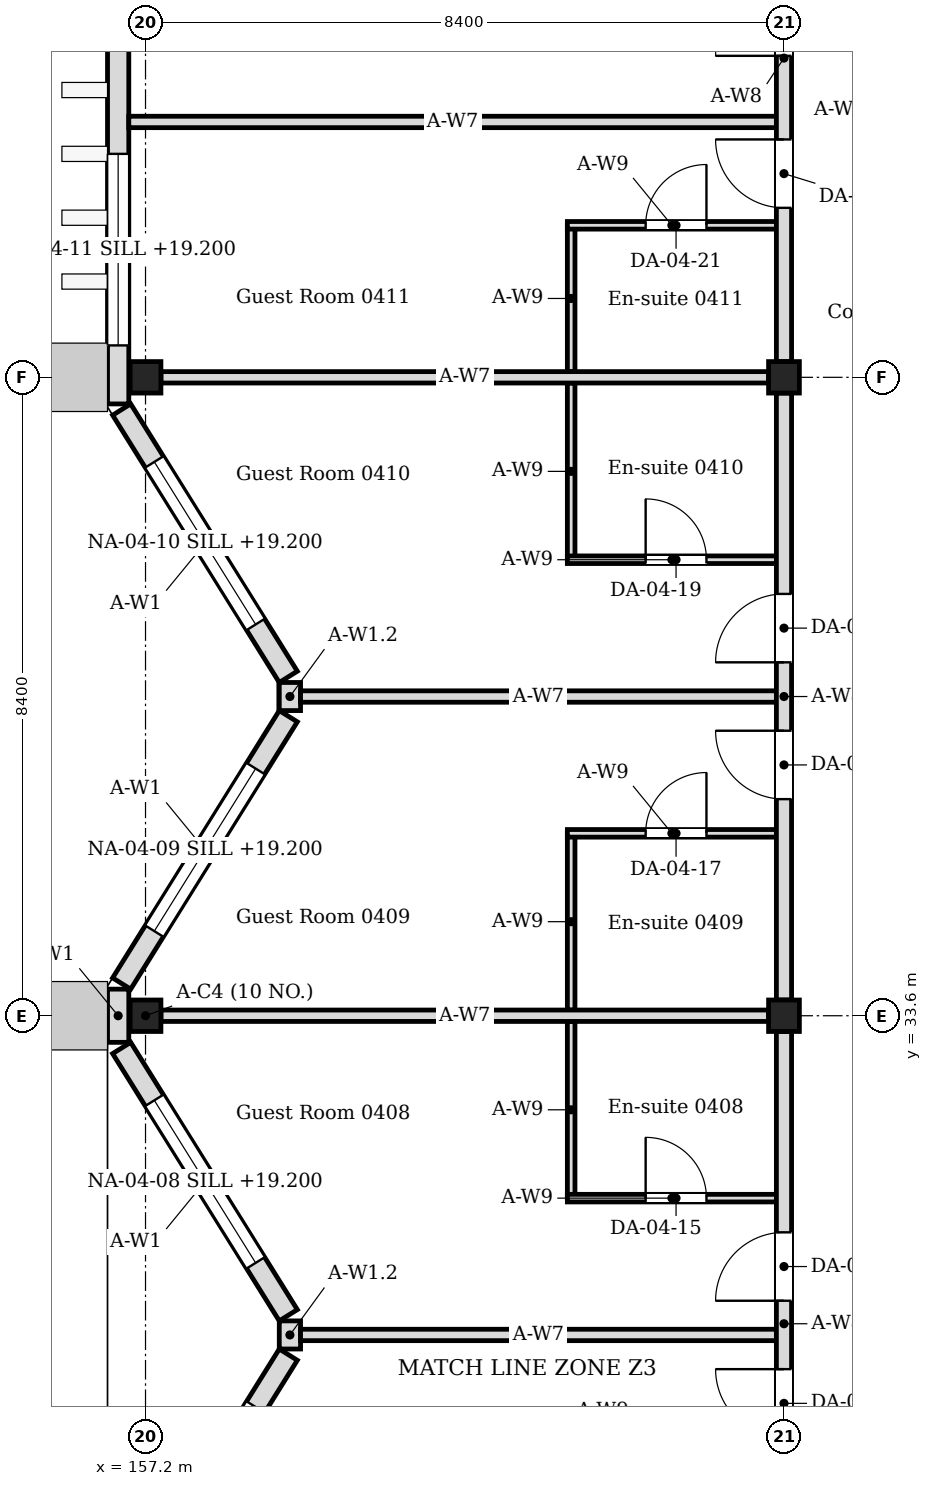
"""IFC4 building model, lengths in metres.
Left out: names, types, materials, properties, quantities, classifications, styles, units other than length and angle.
Written with IfcOpenShell. Run it as: python <this file> out.ifc"""

import sys

from ifc_helpers import new_model, si_unit, direction, frame, frame_2d, origin, origin_2d, place, context, subcontext, project, spatial, rectangle, i_section, extrude, element, fill, save


model = new_model("IFC4")
c1 = context("Model", 3, precision=1e-05, world=origin(), true_north=direction((0.0, 1.0)))
c2 = subcontext(c1, "Body", "Model", "MODEL_VIEW")
j1 = project(units=[si_unit("LENGTHUNIT", "METRE"), si_unit("PLANEANGLEUNIT", "RADIAN")], contexts=[c1])
p1 = place(None, origin())
s1 = spatial("IfcSite", under=j1, at=p1, CompositionType="ELEMENT")
p2 = place(p1, origin())
s2 = spatial("IfcBuilding", under=s1, at=p2, CompositionType="ELEMENT")
p3 = place(p2, frame((0.0, 0.0, 18.6)))
s3 = spatial("IfcBuildingStorey", under=s2, at=p3, CompositionType="ELEMENT", Elevation=18.6)
for number, where, z_axis, x_axis in (
    (1, (157.2, 33.6, 0.0), (0.0, 0.0, 1.0), (1.0, 0.0, 0.0)),
    (2, (157.2, 42.0, 0.0), (0.0, 0.0, 1.0), (1.0, 0.0, 0.0)),
    (3, (165.6, 33.6, 0.0), (0.0, 0.0, 1.0), (1.0, 0.0, 0.0)),
    (4, (165.6, 42.0, 0.0), (0.0, 0.0, 1.0), (1.0, 0.0, 0.0)),
):
    element("IfcColumn", number, at=place(p3, frame(where, z_axis=z_axis, x_axis=x_axis)), inside=s3, PredefinedType="COLUMN", context=c2, shape_type="SweptSolid", body=[
        extrude(i_section(OverallWidth=0.405, OverallDepth=0.414, WebThickness=0.018, FlangeThickness=0.028, FilletRadius=0.022, at=origin_2d()), origin(), (0.0, 0.0, 1.0), 4.2),
    ])
p4 = place(p3, frame((156.886, 25.624, 0.0), z_axis=(0.0, 0.0, 1.0), x_axis=(0.528992500338, 0.848626498871, 0.0)))
e5 = element("IfcWall", 5, at=p4, inside=s3, PredefinedType="SOLIDWALL", context=c2, shape_type="SweptSolid", body=[
    extrude(rectangle(XDim=4.145, YDim=0.28, at=frame_2d((2.072, 0.0))), origin(), (0.0, 0.0, 1.0), 4.05),
])
p5 = place(p4, frame((0.812, 0.0, 0.6)))
e6 = element("IfcOpeningElement", 6, at=p5, cuts=e5, PredefinedType="OPENING", context=c2, shape_type="SweptSolid", body=[
    extrude(rectangle(XDim=2.52, YDim=2.4, at=frame_2d((1.26, 1.2))), frame((0.0, 0.15, 0.0), z_axis=(0.0, -1.0, 0.0), x_axis=(1.0, 0.0, 0.0)), (0.0, 0.0, 1.0), 0.3),
])
p6 = place(p3, frame((159.079, 29.659, 0.0), z_axis=(0.0, 0.0, 1.0), x_axis=(-0.529018946142, 0.848610013271, 0.0)))
e7 = element("IfcWall", 7, at=p6, inside=s3, PredefinedType="SOLIDWALL", context=c2, shape_type="SweptSolid", body=[
    extrude(rectangle(XDim=4.144, YDim=0.28, at=frame_2d((2.072, 0.0))), origin(), (0.0, 0.0, 1.0), 4.05),
])
p7 = place(p6, frame((0.812, 0.0, 0.6)))
e8 = element("IfcOpeningElement", 8, at=p7, cuts=e7, PredefinedType="OPENING", context=c2, shape_type="SweptSolid", body=[
    extrude(rectangle(XDim=2.52, YDim=2.4, at=frame_2d((1.26, 1.2))), frame((0.0, 0.15, 0.0), z_axis=(0.0, -1.0, 0.0), x_axis=(1.0, 0.0, 0.0)), (0.0, 0.0, 1.0), 0.3),
])
p8 = place(p3, frame((159.1, 29.215, 0.0), z_axis=(0.0, 0.0, 1.0), x_axis=(0.0, 1.0, 0.0)))
e9 = element("IfcWall", 9, at=p8, inside=s3, PredefinedType="SOLIDWALL", context=c2, shape_type="SweptSolid", body=[
    extrude(rectangle(XDim=0.37, YDim=0.28, at=frame_2d((0.185, 0.0))), origin(), (0.0, 0.0, 1.0), 3.604),
])
p9 = place(p3, frame((156.84, 33.25, 0.0), z_axis=(0.0, 0.0, 1.0), x_axis=(0.0, 1.0, 0.0)))
e10 = element("IfcWall", 10, at=p9, inside=s3, PredefinedType="SOLIDWALL", context=c2, shape_type="SweptSolid", body=[
    extrude(rectangle(XDim=0.7, YDim=0.28, at=frame_2d((0.35, 0.0))), origin(), (0.0, 0.0, 1.0), 4.05),
])
p10 = place(p3, frame((156.886, 34.024, 0.0), z_axis=(0.0, 0.0, 1.0), x_axis=(0.529018946142, 0.848610013271, 0.0)))
e11 = element("IfcWall", 11, at=p10, inside=s3, PredefinedType="SOLIDWALL", context=c2, shape_type="SweptSolid", body=[
    extrude(rectangle(XDim=4.144, YDim=0.28, at=frame_2d((2.072, 0.0))), origin(), (0.0, 0.0, 1.0), 4.05),
])
p11 = place(p10, frame((0.812, 0.0, 0.6)))
e12 = element("IfcOpeningElement", 12, at=p11, cuts=e11, PredefinedType="OPENING", context=c2, shape_type="SweptSolid", body=[
    extrude(rectangle(XDim=2.52, YDim=2.4, at=frame_2d((1.26, 1.2))), frame((0.0, 0.15, 0.0), z_axis=(0.0, -1.0, 0.0), x_axis=(1.0, 0.0, 0.0)), (0.0, 0.0, 1.0), 0.3),
])
p12 = place(p3, frame((159.079, 38.059, 0.0), z_axis=(0.0, 0.0, 1.0), x_axis=(-0.529018946142, 0.848610013271, 0.0)))
e13 = element("IfcWall", 13, at=p12, inside=s3, PredefinedType="SOLIDWALL", context=c2, shape_type="SweptSolid", body=[
    extrude(rectangle(XDim=4.144, YDim=0.28, at=frame_2d((2.072, 0.0))), origin(), (0.0, 0.0, 1.0), 4.05),
])
p13 = place(p12, frame((0.812, 0.0, 0.6)))
e14 = element("IfcOpeningElement", 14, at=p13, cuts=e13, PredefinedType="OPENING", context=c2, shape_type="SweptSolid", body=[
    extrude(rectangle(XDim=2.52, YDim=2.4, at=frame_2d((1.26, 1.2))), frame((0.0, 0.15, 0.0), z_axis=(0.0, -1.0, 0.0), x_axis=(1.0, 0.0, 0.0)), (0.0, 0.0, 1.0), 0.3),
])
p14 = place(p3, frame((159.1, 37.615, 0.0), z_axis=(0.0, 0.0, 1.0), x_axis=(0.0, 1.0, 0.0)))
e15 = element("IfcWall", 15, at=p14, inside=s3, PredefinedType="SOLIDWALL", context=c2, shape_type="SweptSolid", body=[
    extrude(rectangle(XDim=0.37, YDim=0.28, at=frame_2d((0.185, 0.0))), origin(), (0.0, 0.0, 1.0), 3.604),
])
p15 = place(p3, frame((156.84, 41.65, 0.0), z_axis=(0.0, 0.0, 1.0), x_axis=(0.0, 1.0, 0.0)))
e16 = element("IfcWall", 16, at=p15, inside=s3, PredefinedType="SOLIDWALL", context=c2, shape_type="SweptSolid", body=[
    extrude(rectangle(XDim=17.5, YDim=0.28, at=frame_2d((8.75, 0.0))), origin(), (0.0, 0.0, 1.0), 4.05),
])
p16 = place(p15, frame((0.77, 0.0, 0.6)))
e17 = element("IfcOpeningElement", 17, at=p16, cuts=e16, PredefinedType="OPENING", context=c2, shape_type="SweptSolid", body=[
    extrude(rectangle(XDim=2.52, YDim=2.4, at=frame_2d((1.26, 1.2))), frame((0.0, 0.15, 0.0), z_axis=(0.0, -1.0, 0.0), x_axis=(1.0, 0.0, 0.0)), (0.0, 0.0, 1.0), 0.3),
])
p17 = place(p15, frame((4.97, 0.0, 0.6)))
e18 = element("IfcOpeningElement", 18, at=p17, cuts=e16, PredefinedType="OPENING", context=c2, shape_type="SweptSolid", body=[
    extrude(rectangle(XDim=2.52, YDim=2.4, at=frame_2d((1.26, 1.2))), frame((0.0, 0.15, 0.0), z_axis=(0.0, -1.0, 0.0), x_axis=(1.0, 0.0, 0.0)), (0.0, 0.0, 1.0), 0.3),
])
p18 = place(p15, frame((9.17, 0.0, 0.6)))
e19 = element("IfcOpeningElement", 19, at=p18, cuts=e16, PredefinedType="OPENING", context=c2, shape_type="SweptSolid", body=[
    extrude(rectangle(XDim=2.52, YDim=2.4, at=frame_2d((1.26, 1.2))), frame((0.0, 0.15, 0.0), z_axis=(0.0, -1.0, 0.0), x_axis=(1.0, 0.0, 0.0)), (0.0, 0.0, 1.0), 0.3),
])
p19 = place(p15, frame((13.37, 0.0, 0.45)))
e20 = element("IfcOpeningElement", 20, at=p19, cuts=e16, PredefinedType="OPENING", context=c2, shape_type="SweptSolid", body=[
    extrude(rectangle(XDim=2.52, YDim=2.1, at=frame_2d((1.26, 1.05))), frame((0.0, 0.15, 0.0), z_axis=(0.0, -1.0, 0.0), x_axis=(1.0, 0.0, 0.0)), (0.0, 0.0, 1.0), 0.3),
])
p20 = place(p3, frame((162.8, 31.2, 0.0), z_axis=(0.0, 0.0, 1.0), x_axis=(0.0, 1.0, 0.0)))
e21 = element("IfcWall", 21, at=p20, inside=s3, PredefinedType="PARTITIONING", context=c2, shape_type="SweptSolid", body=[
    extrude(rectangle(XDim=2.325, YDim=0.1, at=frame_2d((1.163, 0.0))), origin(), (0.0, 0.0, 1.0), 4.05),
])
p21 = place(p3, frame((162.75, 31.2, 0.0), z_axis=(0.0, 0.0, 1.0), x_axis=(1.0, 0.0, 0.0)))
e22 = element("IfcWall", 22, at=p21, inside=s3, PredefinedType="PARTITIONING", context=c2, shape_type="SweptSolid", body=[
    extrude(rectangle(XDim=2.75, YDim=0.1, at=frame_2d((1.375, 0.0))), origin(), (0.0, 0.0, 1.0), 4.05),
])
p22 = place(p21, frame((1.03, 0.0, 0.0)))
e23 = element("IfcOpeningElement", 23, at=p22, cuts=e22, PredefinedType="OPENING", context=c2, shape_type="SweptSolid", body=[
    extrude(rectangle(XDim=0.8, YDim=2.1, at=frame_2d((0.4, 1.05))), frame((0.0, 0.06, 0.0), z_axis=(0.0, -1.0, 0.0), x_axis=(1.0, 0.0, 0.0)), (0.0, 0.0, 1.0), 0.12),
])
p23 = place(p3, frame((162.8, 33.675, 0.0), z_axis=(0.0, 0.0, 1.0), x_axis=(0.0, 1.0, 0.0)))
e24 = element("IfcWall", 24, at=p23, inside=s3, PredefinedType="PARTITIONING", context=c2, shape_type="SweptSolid", body=[
    extrude(rectangle(XDim=2.325, YDim=0.1, at=frame_2d((1.163, 0.0))), origin(), (0.0, 0.0, 1.0), 4.05),
])
p24 = place(p3, frame((162.75, 36.0, 0.0), z_axis=(0.0, 0.0, 1.0), x_axis=(1.0, 0.0, 0.0)))
e25 = element("IfcWall", 25, at=p24, inside=s3, PredefinedType="PARTITIONING", context=c2, shape_type="SweptSolid", body=[
    extrude(rectangle(XDim=2.75, YDim=0.1, at=frame_2d((1.375, 0.0))), origin(), (0.0, 0.0, 1.0), 4.05),
])
p25 = place(p24, frame((1.03, 0.0, 0.0)))
e26 = element("IfcOpeningElement", 26, at=p25, cuts=e25, PredefinedType="OPENING", context=c2, shape_type="SweptSolid", body=[
    extrude(rectangle(XDim=0.8, YDim=2.1, at=frame_2d((0.4, 1.05))), frame((0.0, 0.06, 0.0), z_axis=(0.0, -1.0, 0.0), x_axis=(1.0, 0.0, 0.0)), (0.0, 0.0, 1.0), 0.12),
])
p26 = place(p3, frame((162.8, 39.6, 0.0), z_axis=(0.0, 0.0, 1.0), x_axis=(0.0, 1.0, 0.0)))
e27 = element("IfcWall", 27, at=p26, inside=s3, PredefinedType="PARTITIONING", context=c2, shape_type="SweptSolid", body=[
    extrude(rectangle(XDim=2.325, YDim=0.1, at=frame_2d((1.163, 0.0))), origin(), (0.0, 0.0, 1.0), 4.05),
])
p27 = place(p3, frame((162.75, 39.6, 0.0), z_axis=(0.0, 0.0, 1.0), x_axis=(1.0, 0.0, 0.0)))
e28 = element("IfcWall", 28, at=p27, inside=s3, PredefinedType="PARTITIONING", context=c2, shape_type="SweptSolid", body=[
    extrude(rectangle(XDim=2.75, YDim=0.1, at=frame_2d((1.375, 0.0))), origin(), (0.0, 0.0, 1.0), 4.05),
])
p28 = place(p27, frame((1.03, 0.0, 0.0)))
e29 = element("IfcOpeningElement", 29, at=p28, cuts=e28, PredefinedType="OPENING", context=c2, shape_type="SweptSolid", body=[
    extrude(rectangle(XDim=0.8, YDim=2.1, at=frame_2d((0.4, 1.05))), frame((0.0, 0.06, 0.0), z_axis=(0.0, -1.0, 0.0), x_axis=(1.0, 0.0, 0.0)), (0.0, 0.0, 1.0), 0.12),
])
p29 = place(p3, frame((162.8, 42.075, 0.0), z_axis=(0.0, 0.0, 1.0), x_axis=(0.0, 1.0, 0.0)))
e30 = element("IfcWall", 30, at=p29, inside=s3, PredefinedType="PARTITIONING", context=c2, shape_type="SweptSolid", body=[
    extrude(rectangle(XDim=1.925, YDim=0.1, at=frame_2d((0.962, 0.0))), origin(), (0.0, 0.0, 1.0), 4.05),
])
p30 = place(p3, frame((162.75, 44.0, 0.0), z_axis=(0.0, 0.0, 1.0), x_axis=(1.0, 0.0, 0.0)))
e31 = element("IfcWall", 31, at=p30, inside=s3, PredefinedType="PARTITIONING", context=c2, shape_type="SweptSolid", body=[
    extrude(rectangle(XDim=2.75, YDim=0.1, at=frame_2d((1.375, 0.0))), origin(), (0.0, 0.0, 1.0), 4.05),
])
p31 = place(p30, frame((1.03, 0.0, 0.0)))
e32 = element("IfcOpeningElement", 32, at=p31, cuts=e31, PredefinedType="OPENING", context=c2, shape_type="SweptSolid", body=[
    extrude(rectangle(XDim=0.8, YDim=2.1, at=frame_2d((0.4, 1.05))), frame((0.0, 0.06, 0.0), z_axis=(0.0, -1.0, 0.0), x_axis=(1.0, 0.0, 0.0)), (0.0, 0.0, 1.0), 0.12),
])
for number, where, z_axis, x_axis in (
    (33, (157.403, 33.6, 0.0), (0.0, 0.0, 1.0), (1.0, 0.0, 0.0)),
    (34, (157.403, 42.0, 0.0), (0.0, 0.0, 1.0), (1.0, 0.0, 0.0)),
):
    element("IfcWall", number, at=place(p3, frame(where, z_axis=z_axis, x_axis=x_axis)), inside=s3, PredefinedType="PARTITIONING", context=c2, shape_type="SweptSolid", body=[
        extrude(rectangle(XDim=7.995, YDim=0.15, at=frame_2d((3.998, 0.0))), origin(), (0.0, 0.0, 1.0), 3.604),
    ])
for number, where, z_axis, x_axis in (
    (35, (159.24, 29.4, 0.0), (0.0, 0.0, 1.0), (1.0, 0.0, 0.0)),
    (36, (159.24, 37.8, 0.0), (0.0, 0.0, 1.0), (1.0, 0.0, 0.0)),
):
    element("IfcWall", number, at=place(p3, frame(where, z_axis=z_axis, x_axis=x_axis)), inside=s3, PredefinedType="PARTITIONING", context=c2, shape_type="SweptSolid", body=[
        extrude(rectangle(XDim=6.26, YDim=0.15, at=frame_2d((3.13, 0.0))), origin(), (0.0, 0.0, 1.0), 3.604),
    ])
p32 = place(p3, frame((156.98, 45.36, 0.0), z_axis=(0.0, 0.0, 1.0), x_axis=(1.0, 0.0, 0.0)))
e37 = element("IfcWall", 37, at=p32, inside=s3, PredefinedType="PARTITIONING", context=c2, shape_type="SweptSolid", body=[
    extrude(rectangle(XDim=8.52, YDim=0.15, at=frame_2d((4.26, 0.0))), origin(), (0.0, 0.0, 1.0), 3.604),
])
p33 = place(p3, frame((165.6, 25.407, 0.0), z_axis=(0.0, 0.0, 1.0), x_axis=(0.0, 1.0, 0.0)))
e38 = element("IfcWall", 38, at=p33, inside=s3, PredefinedType="PARTITIONING", context=c2, shape_type="SweptSolid", body=[
    extrude(rectangle(XDim=7.986, YDim=0.2, at=frame_2d((3.993, 0.0))), origin(), (0.0, 0.0, 1.0), 3.45),
])
p34 = place(p33, frame((2.643, 0.0, 0.0)))
e39 = element("IfcOpeningElement", 39, at=p34, cuts=e38, PredefinedType="OPENING", context=c2, shape_type="SweptSolid", body=[
    extrude(rectangle(XDim=0.9, YDim=2.1, at=frame_2d((0.45, 1.05))), frame((0.0, 0.11, 0.0), z_axis=(0.0, -1.0, 0.0), x_axis=(1.0, 0.0, 0.0)), (0.0, 0.0, 1.0), 0.22),
])
p35 = place(p33, frame((4.443, 0.0, 0.0)))
e40 = element("IfcOpeningElement", 40, at=p35, cuts=e38, PredefinedType="OPENING", context=c2, shape_type="SweptSolid", body=[
    extrude(rectangle(XDim=0.9, YDim=2.1, at=frame_2d((0.45, 1.05))), frame((0.0, 0.11, 0.0), z_axis=(0.0, -1.0, 0.0), x_axis=(1.0, 0.0, 0.0)), (0.0, 0.0, 1.0), 0.22),
])
p36 = place(p3, frame((165.6, 33.807, 0.0), z_axis=(0.0, 0.0, 1.0), x_axis=(0.0, 1.0, 0.0)))
e41 = element("IfcWall", 41, at=p36, inside=s3, PredefinedType="PARTITIONING", context=c2, shape_type="SweptSolid", body=[
    extrude(rectangle(XDim=7.986, YDim=0.2, at=frame_2d((3.993, 0.0))), origin(), (0.0, 0.0, 1.0), 3.45),
])
p37 = place(p36, frame((2.643, 0.0, 0.0)))
e42 = element("IfcOpeningElement", 42, at=p37, cuts=e41, PredefinedType="OPENING", context=c2, shape_type="SweptSolid", body=[
    extrude(rectangle(XDim=0.9, YDim=2.1, at=frame_2d((0.45, 1.05))), frame((0.0, 0.11, 0.0), z_axis=(0.0, -1.0, 0.0), x_axis=(1.0, 0.0, 0.0)), (0.0, 0.0, 1.0), 0.22),
])
p38 = place(p36, frame((4.443, 0.0, 0.0)))
e43 = element("IfcOpeningElement", 43, at=p38, cuts=e41, PredefinedType="OPENING", context=c2, shape_type="SweptSolid", body=[
    extrude(rectangle(XDim=0.9, YDim=2.1, at=frame_2d((0.45, 1.05))), frame((0.0, 0.11, 0.0), z_axis=(0.0, -1.0, 0.0), x_axis=(1.0, 0.0, 0.0)), (0.0, 0.0, 1.0), 0.22),
])
p39 = place(p3, frame((165.6, 42.207, 0.0), z_axis=(0.0, 0.0, 1.0), x_axis=(0.0, 1.0, 0.0)))
e44 = element("IfcWall", 44, at=p39, inside=s3, PredefinedType="PARTITIONING", context=c2, shape_type="SweptSolid", body=[
    extrude(rectangle(XDim=7.986, YDim=0.2, at=frame_2d((3.993, 0.0))), origin(), (0.0, 0.0, 1.0), 3.45),
])
p40 = place(p39, frame((2.023, 0.0, 0.0)))
e45 = element("IfcOpeningElement", 45, at=p40, cuts=e44, PredefinedType="OPENING", context=c2, shape_type="SweptSolid", body=[
    extrude(rectangle(XDim=0.9, YDim=2.1, at=frame_2d((0.45, 1.05))), frame((0.0, 0.11, 0.0), z_axis=(0.0, -1.0, 0.0), x_axis=(1.0, 0.0, 0.0)), (0.0, 0.0, 1.0), 0.22),
])
p41 = place(p39, frame((4.023, 0.0, 0.0)))
e46 = element("IfcOpeningElement", 46, at=p41, cuts=e44, PredefinedType="OPENING", context=c2, shape_type="SweptSolid", body=[
    extrude(rectangle(XDim=0.9, YDim=2.1, at=frame_2d((0.45, 1.05))), frame((0.0, 0.11, 0.0), z_axis=(0.0, -1.0, 0.0), x_axis=(1.0, 0.0, 0.0)), (0.0, 0.0, 1.0), 0.22),
])
p42 = place(p7, origin())
e47 = element("IfcWindow", 47, at=p42, inside=s3, PartitioningType="SINGLE_PANEL", PredefinedType="WINDOW", context=c2, shape_type="SweptSolid", body=[
    extrude(rectangle(XDim=2.52, YDim=2.4, at=frame_2d((1.26, 1.2))), frame((0.0, 0.03, 0.0), z_axis=(0.0, -1.0, 0.0), x_axis=(1.0, 0.0, 0.0)), (0.0, 0.0, 1.0), 0.06),
])
fill(e8, e47)
p43 = place(p11, origin())
e48 = element("IfcWindow", 48, at=p43, inside=s3, PartitioningType="SINGLE_PANEL", PredefinedType="WINDOW", context=c2, shape_type="SweptSolid", body=[
    extrude(rectangle(XDim=2.52, YDim=2.4, at=frame_2d((1.26, 1.2))), frame((0.0, 0.03, 0.0), z_axis=(0.0, -1.0, 0.0), x_axis=(1.0, 0.0, 0.0)), (0.0, 0.0, 1.0), 0.06),
])
fill(e12, e48)
p44 = place(p13, origin())
e49 = element("IfcWindow", 49, at=p44, inside=s3, PartitioningType="SINGLE_PANEL", PredefinedType="WINDOW", context=c2, shape_type="SweptSolid", body=[
    extrude(rectangle(XDim=2.52, YDim=2.4, at=frame_2d((1.26, 1.2))), frame((0.0, 0.03, 0.0), z_axis=(0.0, -1.0, 0.0), x_axis=(1.0, 0.0, 0.0)), (0.0, 0.0, 1.0), 0.06),
])
fill(e14, e49)
p45 = place(p16, origin())
e50 = element("IfcWindow", 50, at=p45, inside=s3, PartitioningType="SINGLE_PANEL", PredefinedType="WINDOW", context=c2, shape_type="SweptSolid", body=[
    extrude(rectangle(XDim=2.52, YDim=2.4, at=frame_2d((1.26, 1.2))), frame((0.0, 0.03, 0.0), z_axis=(0.0, -1.0, 0.0), x_axis=(1.0, 0.0, 0.0)), (0.0, 0.0, 1.0), 0.06),
])
fill(e17, e50)
p46 = place(p34, origin())
e51 = element("IfcDoor", 51, at=p46, inside=s3, OperationType="SINGLE_SWING_RIGHT", PredefinedType="DOOR", context=c2, shape_type="SweptSolid", body=[
    extrude(rectangle(XDim=0.9, YDim=2.1, at=frame_2d((0.45, 1.05))), frame((0.0, 0.025, 0.0), z_axis=(0.0, -1.0, 0.0), x_axis=(1.0, 0.0, 0.0)), (0.0, 0.0, 1.0), 0.05),
])
fill(e39, e51)
p47 = place(p22, origin())
e52 = element("IfcDoor", 52, at=p47, inside=s3, OperationType="SINGLE_SWING_LEFT", PredefinedType="DOOR", context=c2, shape_type="SweptSolid", body=[
    extrude(rectangle(XDim=0.8, YDim=2.1, at=frame_2d((0.4, 1.05))), frame((0.0, 0.025, 0.0), z_axis=(0.0, -1.0, 0.0), x_axis=(1.0, 0.0, 0.0)), (0.0, 0.0, 1.0), 0.05),
])
fill(e23, e52)
p48 = place(p35, origin())
e53 = element("IfcDoor", 53, at=p48, inside=s3, OperationType="SINGLE_SWING_LEFT", PredefinedType="DOOR", context=c2, shape_type="SweptSolid", body=[
    extrude(rectangle(XDim=0.9, YDim=2.1, at=frame_2d((0.45, 1.05))), frame((0.0, 0.025, 0.0), z_axis=(0.0, -1.0, 0.0), x_axis=(1.0, 0.0, 0.0)), (0.0, 0.0, 1.0), 0.05),
])
fill(e40, e53)
p49 = place(p25, origin())
e54 = element("IfcDoor", 54, at=p49, inside=s3, OperationType="SINGLE_SWING_RIGHT", PredefinedType="DOOR", context=c2, shape_type="SweptSolid", body=[
    extrude(rectangle(XDim=0.8, YDim=2.1, at=frame_2d((0.4, 1.05))), frame((0.0, 0.025, 0.0), z_axis=(0.0, -1.0, 0.0), x_axis=(1.0, 0.0, 0.0)), (0.0, 0.0, 1.0), 0.05),
])
fill(e26, e54)
p50 = place(p37, origin())
e55 = element("IfcDoor", 55, at=p50, inside=s3, OperationType="SINGLE_SWING_RIGHT", PredefinedType="DOOR", context=c2, shape_type="SweptSolid", body=[
    extrude(rectangle(XDim=0.9, YDim=2.1, at=frame_2d((0.45, 1.05))), frame((0.0, 0.025, 0.0), z_axis=(0.0, -1.0, 0.0), x_axis=(1.0, 0.0, 0.0)), (0.0, 0.0, 1.0), 0.05),
])
fill(e42, e55)
p51 = place(p28, origin())
e56 = element("IfcDoor", 56, at=p51, inside=s3, OperationType="SINGLE_SWING_LEFT", PredefinedType="DOOR", context=c2, shape_type="SweptSolid", body=[
    extrude(rectangle(XDim=0.8, YDim=2.1, at=frame_2d((0.4, 1.05))), frame((0.0, 0.025, 0.0), z_axis=(0.0, -1.0, 0.0), x_axis=(1.0, 0.0, 0.0)), (0.0, 0.0, 1.0), 0.05),
])
fill(e29, e56)
p52 = place(p38, origin())
e57 = element("IfcDoor", 57, at=p52, inside=s3, OperationType="SINGLE_SWING_LEFT", PredefinedType="DOOR", context=c2, shape_type="SweptSolid", body=[
    extrude(rectangle(XDim=0.9, YDim=2.1, at=frame_2d((0.45, 1.05))), frame((0.0, 0.025, 0.0), z_axis=(0.0, -1.0, 0.0), x_axis=(1.0, 0.0, 0.0)), (0.0, 0.0, 1.0), 0.05),
])
fill(e43, e57)
p53 = place(p31, origin())
e58 = element("IfcDoor", 58, at=p53, inside=s3, OperationType="SINGLE_SWING_RIGHT", PredefinedType="DOOR", context=c2, shape_type="SweptSolid", body=[
    extrude(rectangle(XDim=0.8, YDim=2.1, at=frame_2d((0.4, 1.05))), frame((0.0, 0.025, 0.0), z_axis=(0.0, -1.0, 0.0), x_axis=(1.0, 0.0, 0.0)), (0.0, 0.0, 1.0), 0.05),
])
fill(e32, e58)
p54 = place(p40, origin())
e59 = element("IfcDoor", 59, at=p54, inside=s3, OperationType="SINGLE_SWING_RIGHT", PredefinedType="DOOR", context=c2, shape_type="SweptSolid", body=[
    extrude(rectangle(XDim=0.9, YDim=2.1, at=frame_2d((0.45, 1.05))), frame((0.0, 0.025, 0.0), z_axis=(0.0, -1.0, 0.0), x_axis=(1.0, 0.0, 0.0)), (0.0, 0.0, 1.0), 0.05),
])
fill(e45, e59)
p55 = place(p41, origin())
e60 = element("IfcDoor", 60, at=p55, inside=s3, OperationType="SINGLE_SWING_LEFT", PredefinedType="DOOR", context=c2, shape_type="SweptSolid", body=[
    extrude(rectangle(XDim=0.9, YDim=2.1, at=frame_2d((0.45, 1.05))), frame((0.0, 0.025, 0.0), z_axis=(0.0, -1.0, 0.0), x_axis=(1.0, 0.0, 0.0)), (0.0, 0.0, 1.0), 0.05),
])
fill(e46, e60)
save(model, sys.argv[1])
